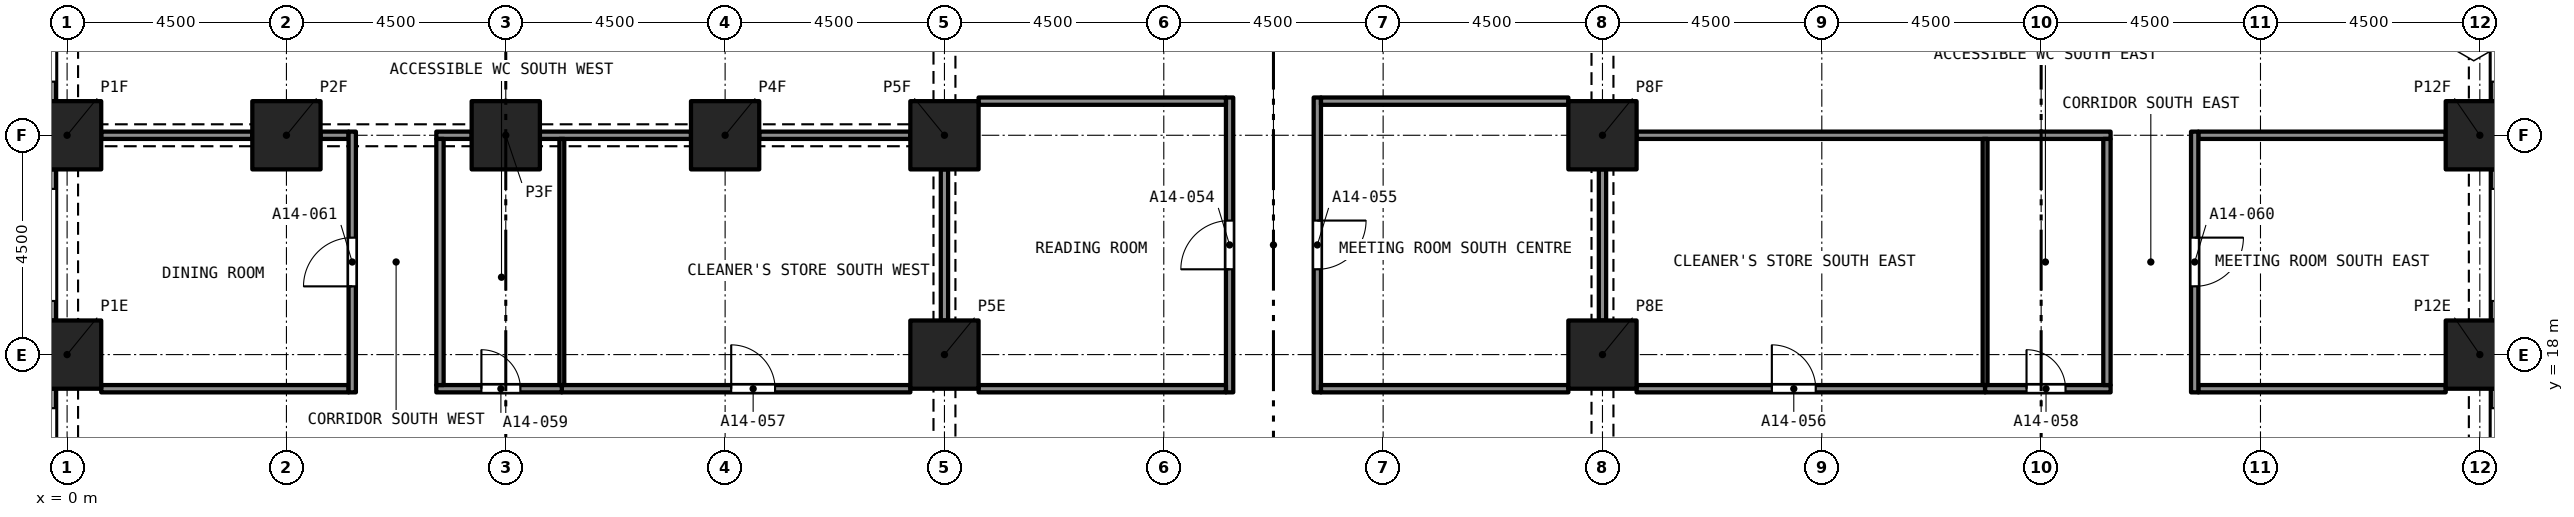
"""IFC4 building model, lengths in metres.
Left out: names, types, materials, properties, quantities, classifications, styles, units other than length and angle.
Written with IfcOpenShell. Run it as: python <this file> out.ifc"""

import sys

from ifc_helpers import new_model, si_unit, direction, frame, frame_2d, origin, origin_2d, place, context, subcontext, project, spatial, rectangle, extrude, element, fill, save


model = new_model("IFC4")
c1 = context("Model", 3, precision=1e-05, world=origin(), true_north=direction((0.0, 1.0)))
c2 = subcontext(c1, "Body", "Model", "MODEL_VIEW")
j1 = project(units=[si_unit("LENGTHUNIT", "METRE"), si_unit("PLANEANGLEUNIT", "RADIAN")], contexts=[c1])
p1 = place(None, origin())
s1 = spatial("IfcSite", under=j1, at=p1, CompositionType="ELEMENT")
p2 = place(p1, origin())
s2 = spatial("IfcBuilding", under=s1, at=p2, CompositionType="ELEMENT")
p3 = place(p2, frame((0.0, 0.0, 56.0)))
s3 = spatial("IfcBuildingStorey", under=s2, at=p3, CompositionType="ELEMENT", Elevation=56.0)
for number, where, z_axis, x_axis in (
    (1, (0.0, 18.0, 0.0), (0.0, 0.0, 1.0), (1.0, 0.0, 0.0)),
    (2, (18.0, 18.0, 0.0), (0.0, 0.0, 1.0), (1.0, 0.0, 0.0)),
    (3, (31.5, 18.0, 0.0), (0.0, 0.0, 1.0), (1.0, 0.0, 0.0)),
    (4, (49.5, 18.0, 0.0), (0.0, 0.0, 1.0), (1.0, 0.0, 0.0)),
    (5, (0.0, 22.5, 0.0), (0.0, 0.0, 1.0), (1.0, 0.0, 0.0)),
    (6, (4.5, 22.5, 0.0), (0.0, 0.0, 1.0), (1.0, 0.0, 0.0)),
    (7, (9.0, 22.5, 0.0), (0.0, 0.0, 1.0), (1.0, 0.0, 0.0)),
    (8, (13.5, 22.5, 0.0), (0.0, 0.0, 1.0), (1.0, 0.0, 0.0)),
    (9, (18.0, 22.5, 0.0), (0.0, 0.0, 1.0), (1.0, 0.0, 0.0)),
    (10, (31.5, 22.5, 0.0), (0.0, 0.0, 1.0), (1.0, 0.0, 0.0)),
    (11, (49.5, 22.5, 0.0), (0.0, 0.0, 1.0), (1.0, 0.0, 0.0)),
):
    element("IfcColumn", number, at=place(p3, frame(where, z_axis=z_axis, x_axis=x_axis)), inside=s3, PredefinedType="COLUMN", context=c2, shape_type="SweptSolid", body=[
        extrude(rectangle(XDim=1.4, YDim=1.4, at=origin_2d()), origin(), (0.0, 0.0, 1.0), 3.2),
    ])
p4 = place(p3, frame((49.875, 17.3, 0.0), z_axis=(0.0, 0.0, 1.0), x_axis=(0.0, -1.0, 0.0)))
e12 = element("IfcWall", 12, at=p4, inside=s3, PredefinedType="SOLIDWALL", context=c2, shape_type="SweptSolid", body=[
    extrude(rectangle(XDim=3.1, YDim=0.3, at=frame_2d((1.55, 0.0))), origin(), (0.0, 0.0, 1.0), 3.2),
])
p5 = place(p4, frame((0.4, 0.0, 0.45)))
e13 = element("IfcOpeningElement", 13, at=p5, cuts=e12, PredefinedType="OPENING", context=c2, shape_type="SweptSolid", body=[
    extrude(rectangle(XDim=2.3, YDim=1.95, at=frame_2d((1.15, 0.975))), frame((0.0, 0.16, 0.0), z_axis=(0.0, -1.0, 0.0), x_axis=(1.0, 0.0, 0.0)), (0.0, 0.0, 1.0), 0.32),
])
p6 = place(p3, frame((49.875, 21.8, 0.0), z_axis=(0.0, 0.0, 1.0), x_axis=(0.0, -1.0, 0.0)))
e14 = element("IfcWall", 14, at=p6, inside=s3, PredefinedType="SOLIDWALL", context=c2, shape_type="SweptSolid", body=[
    extrude(rectangle(XDim=3.1, YDim=0.3, at=frame_2d((1.55, 0.0))), origin(), (0.0, 0.0, 1.0), 3.2),
])
p7 = place(p6, frame((0.4, 0.0, 0.45)))
e15 = element("IfcOpeningElement", 15, at=p7, cuts=e14, PredefinedType="OPENING", context=c2, shape_type="SweptSolid", body=[
    extrude(rectangle(XDim=2.3, YDim=1.95, at=frame_2d((1.15, 0.975))), frame((0.0, 0.16, 0.0), z_axis=(0.0, -1.0, 0.0), x_axis=(1.0, 0.0, 0.0)), (0.0, 0.0, 1.0), 0.32),
])
p8 = place(p3, frame((49.875, 26.3, 0.0), z_axis=(0.0, 0.0, 1.0), x_axis=(0.0, -1.0, 0.0)))
e16 = element("IfcWall", 16, at=p8, inside=s3, PredefinedType="SOLIDWALL", context=c2, shape_type="SweptSolid", body=[
    extrude(rectangle(XDim=3.1, YDim=0.3, at=frame_2d((1.55, 0.0))), origin(), (0.0, 0.0, 1.0), 3.2),
])
p9 = place(p8, frame((0.4, 0.0, 0.45)))
e17 = element("IfcOpeningElement", 17, at=p9, cuts=e16, PredefinedType="OPENING", context=c2, shape_type="SweptSolid", body=[
    extrude(rectangle(XDim=2.3, YDim=1.95, at=frame_2d((1.15, 0.975))), frame((0.0, 0.16, 0.0), z_axis=(0.0, -1.0, 0.0), x_axis=(1.0, 0.0, 0.0)), (0.0, 0.0, 1.0), 0.32),
])
p10 = place(p3, frame((-0.375, 23.2, 0.0), z_axis=(0.0, 0.0, 1.0), x_axis=(0.0, 1.0, 0.0)))
e18 = element("IfcWall", 18, at=p10, inside=s3, PredefinedType="SOLIDWALL", context=c2, shape_type="SweptSolid", body=[
    extrude(rectangle(XDim=3.1, YDim=0.3, at=frame_2d((1.55, 0.0))), origin(), (0.0, 0.0, 1.0), 3.2),
])
p11 = place(p10, frame((0.4, 0.0, 0.45)))
e19 = element("IfcOpeningElement", 19, at=p11, cuts=e18, PredefinedType="OPENING", context=c2, shape_type="SweptSolid", body=[
    extrude(rectangle(XDim=2.3, YDim=1.95, at=frame_2d((1.15, 0.975))), frame((0.0, 0.16, 0.0), z_axis=(0.0, -1.0, 0.0), x_axis=(1.0, 0.0, 0.0)), (0.0, 0.0, 1.0), 0.32),
])
p12 = place(p3, frame((-0.375, 18.7, 0.0), z_axis=(0.0, 0.0, 1.0), x_axis=(0.0, 1.0, 0.0)))
e20 = element("IfcWall", 20, at=p12, inside=s3, PredefinedType="SOLIDWALL", context=c2, shape_type="SweptSolid", body=[
    extrude(rectangle(XDim=3.1, YDim=0.3, at=frame_2d((1.55, 0.0))), origin(), (0.0, 0.0, 1.0), 3.2),
])
p13 = place(p12, frame((0.4, 0.0, 0.45)))
e21 = element("IfcOpeningElement", 21, at=p13, cuts=e20, PredefinedType="OPENING", context=c2, shape_type="SweptSolid", body=[
    extrude(rectangle(XDim=2.3, YDim=1.95, at=frame_2d((1.15, 0.975))), frame((0.0, 0.16, 0.0), z_axis=(0.0, -1.0, 0.0), x_axis=(1.0, 0.0, 0.0)), (0.0, 0.0, 1.0), 0.32),
])
p14 = place(p3, frame((-0.375, 14.2, 0.0), z_axis=(0.0, 0.0, 1.0), x_axis=(0.0, 1.0, 0.0)))
e22 = element("IfcWall", 22, at=p14, inside=s3, PredefinedType="SOLIDWALL", context=c2, shape_type="SweptSolid", body=[
    extrude(rectangle(XDim=3.1, YDim=0.3, at=frame_2d((1.55, 0.0))), origin(), (0.0, 0.0, 1.0), 3.2),
])
p15 = place(p14, frame((0.4, 0.0, 0.45)))
e23 = element("IfcOpeningElement", 23, at=p15, cuts=e22, PredefinedType="OPENING", context=c2, shape_type="SweptSolid", body=[
    extrude(rectangle(XDim=2.3, YDim=1.95, at=frame_2d((1.15, 0.975))), frame((0.0, 0.16, 0.0), z_axis=(0.0, -1.0, 0.0), x_axis=(1.0, 0.0, 0.0)), (0.0, 0.0, 1.0), 0.32),
])
p16 = place(p3, frame((23.85, 17.225, 0.0), z_axis=(0.0, 0.0, 1.0), x_axis=(0.0, 1.0, 0.0)))
e24 = element("IfcWall", 24, at=p16, inside=s3, PredefinedType="PARTITIONING", context=c2, shape_type="SweptSolid", body=[
    extrude(rectangle(XDim=6.05, YDim=0.15, at=frame_2d((3.025, 0.0))), origin(), (0.0, 0.0, 1.0), 2.75),
])
p17 = place(p16, frame((2.525, 0.0, 0.0)))
e25 = element("IfcOpeningElement", 25, at=p17, cuts=e24, PredefinedType="OPENING", context=c2, shape_type="SweptSolid", body=[
    extrude(rectangle(XDim=1.0, YDim=2.1, at=frame_2d((0.5, 1.05))), frame((0.0, 0.085, 0.0), z_axis=(0.0, -1.0, 0.0), x_axis=(1.0, 0.0, 0.0)), (0.0, 0.0, 1.0), 0.17),
])
p18 = place(p3, frame((25.65, 23.275, 0.0), z_axis=(0.0, 0.0, 1.0), x_axis=(0.0, -1.0, 0.0)))
e26 = element("IfcWall", 26, at=p18, inside=s3, PredefinedType="PARTITIONING", context=c2, shape_type="SweptSolid", body=[
    extrude(rectangle(XDim=6.05, YDim=0.15, at=frame_2d((3.025, 0.0))), origin(), (0.0, 0.0, 1.0), 2.75),
])
p19 = place(p18, frame((2.525, 0.0, 0.0)))
e27 = element("IfcOpeningElement", 27, at=p19, cuts=e26, PredefinedType="OPENING", context=c2, shape_type="SweptSolid", body=[
    extrude(rectangle(XDim=1.0, YDim=2.1, at=frame_2d((0.5, 1.05))), frame((0.0, 0.085, 0.0), z_axis=(0.0, -1.0, 0.0), x_axis=(1.0, 0.0, 0.0)), (0.0, 0.0, 1.0), 0.17),
])
for number, where, z_axis, x_axis in (
    (28, (18.7, 17.3, 0.0), (0.0, 0.0, 1.0), (1.0, 0.0, 0.0)),
    (29, (25.725, 17.3, 0.0), (0.0, 0.0, 1.0), (1.0, 0.0, 0.0)),
):
    element("IfcWall", number, at=place(p3, frame(where, z_axis=z_axis, x_axis=x_axis)), inside=s3, PredefinedType="PARTITIONING", context=c2, shape_type="SweptSolid", body=[
        extrude(rectangle(XDim=5.075, YDim=0.15, at=frame_2d((2.538, 0.0))), origin(), (0.0, 0.0, 1.0), 2.75),
    ])
p20 = place(p3, frame((32.2, 17.3, 0.0), z_axis=(0.0, 0.0, 1.0), x_axis=(1.0, 0.0, 0.0)))
e30 = element("IfcWall", 30, at=p20, inside=s3, PredefinedType="PARTITIONING", context=c2, shape_type="SweptSolid", body=[
    extrude(rectangle(XDim=7.15, YDim=0.15, at=frame_2d((3.575, 0.0))), origin(), (0.0, 0.0, 1.0), 2.9),
])
p21 = place(p20, frame((2.775, 0.0, 0.0)))
e31 = element("IfcOpeningElement", 31, at=p21, cuts=e30, PredefinedType="OPENING", context=c2, shape_type="SweptSolid", body=[
    extrude(rectangle(XDim=0.9, YDim=2.1, at=frame_2d((0.45, 1.05))), frame((0.0, 0.085, 0.0), z_axis=(0.0, -1.0, 0.0), x_axis=(1.0, 0.0, 0.0)), (0.0, 0.0, 1.0), 0.17),
])
p22 = place(p3, frame((10.15, 17.3, 0.0), z_axis=(0.0, 0.0, 1.0), x_axis=(1.0, 0.0, 0.0)))
e32 = element("IfcWall", 32, at=p22, inside=s3, PredefinedType="PARTITIONING", context=c2, shape_type="SweptSolid", body=[
    extrude(rectangle(XDim=7.15, YDim=0.15, at=frame_2d((3.575, 0.0))), origin(), (0.0, 0.0, 1.0), 2.9),
])
p23 = place(p22, frame((3.475, 0.0, 0.0)))
e33 = element("IfcOpeningElement", 33, at=p23, cuts=e32, PredefinedType="OPENING", context=c2, shape_type="SweptSolid", body=[
    extrude(rectangle(XDim=0.9, YDim=2.1, at=frame_2d((0.45, 1.05))), frame((0.0, 0.085, 0.0), z_axis=(0.0, -1.0, 0.0), x_axis=(1.0, 0.0, 0.0)), (0.0, 0.0, 1.0), 0.17),
])
p24 = place(p3, frame((39.35, 17.3, 0.0), z_axis=(0.0, 0.0, 1.0), x_axis=(1.0, 0.0, 0.0)))
e34 = element("IfcWall", 34, at=p24, inside=s3, PredefinedType="PARTITIONING", context=c2, shape_type="SweptSolid", body=[
    extrude(rectangle(XDim=2.575, YDim=0.15, at=frame_2d((1.288, 0.0))), origin(), (0.0, 0.0, 1.0), 2.9),
])
p25 = place(p24, frame((0.85, 0.0, 0.0)))
e35 = element("IfcOpeningElement", 35, at=p25, cuts=e34, PredefinedType="OPENING", context=c2, shape_type="SweptSolid", body=[
    extrude(rectangle(XDim=0.8, YDim=2.1, at=frame_2d((0.4, 1.05))), frame((0.0, 0.085, 0.0), z_axis=(0.0, -1.0, 0.0), x_axis=(1.0, 0.0, 0.0)), (0.0, 0.0, 1.0), 0.17),
])
p26 = place(p3, frame((7.575, 17.3, 0.0), z_axis=(0.0, 0.0, 1.0), x_axis=(1.0, 0.0, 0.0)))
e36 = element("IfcWall", 36, at=p26, inside=s3, PredefinedType="PARTITIONING", context=c2, shape_type="SweptSolid", body=[
    extrude(rectangle(XDim=2.575, YDim=0.15, at=frame_2d((1.288, 0.0))), origin(), (0.0, 0.0, 1.0), 2.9),
])
p27 = place(p26, frame((0.925, 0.0, 0.0)))
e37 = element("IfcOpeningElement", 37, at=p27, cuts=e36, PredefinedType="OPENING", context=c2, shape_type="SweptSolid", body=[
    extrude(rectangle(XDim=0.8, YDim=2.1, at=frame_2d((0.4, 1.05))), frame((0.0, 0.085, 0.0), z_axis=(0.0, -1.0, 0.0), x_axis=(1.0, 0.0, 0.0)), (0.0, 0.0, 1.0), 0.17),
])
for number, where, z_axis, x_axis in (
    (38, (43.725, 17.3, 0.0), (0.0, 0.0, 1.0), (1.0, 0.0, 0.0)),
    (39, (0.7, 17.3, 0.0), (0.0, 0.0, 1.0), (1.0, 0.0, 0.0)),
):
    element("IfcWall", number, at=place(p3, frame(where, z_axis=z_axis, x_axis=x_axis)), inside=s3, PredefinedType="PARTITIONING", context=c2, shape_type="SweptSolid", body=[
        extrude(rectangle(XDim=5.075, YDim=0.15, at=frame_2d((2.538, 0.0))), origin(), (0.0, 0.0, 1.0), 2.9),
    ])
p28 = place(p3, frame((18.7, 23.2, 0.0), z_axis=(0.0, 0.0, 1.0), x_axis=(1.0, 0.0, 0.0)))
e40 = element("IfcWall", 40, at=p28, inside=s3, PredefinedType="PARTITIONING", context=c2, shape_type="SweptSolid", body=[
    extrude(rectangle(XDim=5.075, YDim=0.15, at=frame_2d((2.538, 0.0))), origin(), (0.0, 0.0, 1.0), 2.75),
])
p29 = place(p3, frame((18.0, 18.7, 0.0), z_axis=(0.0, 0.0, 1.0), x_axis=(0.0, 1.0, 0.0)))
e41 = element("IfcWall", 41, at=p29, inside=s3, PredefinedType="PARTITIONING", context=c2, shape_type="SweptSolid", body=[
    extrude(rectangle(XDim=3.1, YDim=0.15, at=frame_2d((1.55, 0.0))), origin(), (0.0, 0.0, 1.0), 2.38),
])
p30 = place(p3, frame((25.725, 23.2, 0.0), z_axis=(0.0, 0.0, 1.0), x_axis=(1.0, 0.0, 0.0)))
e42 = element("IfcWall", 42, at=p30, inside=s3, PredefinedType="PARTITIONING", context=c2, shape_type="SweptSolid", body=[
    extrude(rectangle(XDim=5.075, YDim=0.15, at=frame_2d((2.538, 0.0))), origin(), (0.0, 0.0, 1.0), 2.75),
])
p31 = place(p3, frame((31.5, 18.7, 0.0), z_axis=(0.0, 0.0, 1.0), x_axis=(0.0, 1.0, 0.0)))
e43 = element("IfcWall", 43, at=p31, inside=s3, PredefinedType="PARTITIONING", context=c2, shape_type="SweptSolid", body=[
    extrude(rectangle(XDim=3.1, YDim=0.15, at=frame_2d((1.55, 0.0))), origin(), (0.0, 0.0, 1.0), 2.38),
])
p32 = place(p3, frame((32.2, 22.5, 0.0), z_axis=(0.0, 0.0, 1.0), x_axis=(1.0, 0.0, 0.0)))
e44 = element("IfcWall", 44, at=p32, inside=s3, PredefinedType="PARTITIONING", context=c2, shape_type="SweptSolid", body=[
    extrude(rectangle(XDim=9.725, YDim=0.15, at=frame_2d((4.863, 0.0))), origin(), (0.0, 0.0, 1.0), 2.9),
])
p33 = place(p3, frame((43.725, 22.5, 0.0), z_axis=(0.0, 0.0, 1.0), x_axis=(1.0, 0.0, 0.0)))
e45 = element("IfcWall", 45, at=p33, inside=s3, PredefinedType="PARTITIONING", context=c2, shape_type="SweptSolid", body=[
    extrude(rectangle(XDim=5.075, YDim=0.15, at=frame_2d((2.538, 0.0))), origin(), (0.0, 0.0, 1.0), 2.9),
])
for number, where, z_axis, x_axis in (
    (46, (14.2, 22.5, 0.0), (0.0, 0.0, 1.0), (1.0, 0.0, 0.0)),
    (47, (9.7, 22.5, 0.0), (0.0, 0.0, 1.0), (1.0, 0.0, 0.0)),
):
    element("IfcWall", number, at=place(p3, frame(where, z_axis=z_axis, x_axis=x_axis)), inside=s3, PredefinedType="PARTITIONING", context=c2, shape_type="SweptSolid", body=[
        extrude(rectangle(XDim=3.1, YDim=0.15, at=frame_2d((1.55, 0.0))), origin(), (0.0, 0.0, 1.0), 2.38),
    ])
p34 = place(p3, frame((7.575, 22.5, 0.0), z_axis=(0.0, 0.0, 1.0), x_axis=(1.0, 0.0, 0.0)))
e48 = element("IfcWall", 48, at=p34, inside=s3, PredefinedType="PARTITIONING", context=c2, shape_type="SweptSolid", body=[
    extrude(rectangle(XDim=0.725, YDim=0.15, at=frame_2d((0.363, 0.0))), origin(), (0.0, 0.0, 1.0), 2.38),
])
p35 = place(p3, frame((5.2, 22.5, 0.0), z_axis=(0.0, 0.0, 1.0), x_axis=(1.0, 0.0, 0.0)))
e49 = element("IfcWall", 49, at=p35, inside=s3, PredefinedType="PARTITIONING", context=c2, shape_type="SweptSolid", body=[
    extrude(rectangle(XDim=0.575, YDim=0.15, at=frame_2d((0.288, 0.0))), origin(), (0.0, 0.0, 1.0), 2.38),
])
p36 = place(p3, frame((0.7, 22.5, 0.0), z_axis=(0.0, 0.0, 1.0), x_axis=(1.0, 0.0, 0.0)))
e50 = element("IfcWall", 50, at=p36, inside=s3, PredefinedType="PARTITIONING", context=c2, shape_type="SweptSolid", body=[
    extrude(rectangle(XDim=3.1, YDim=0.15, at=frame_2d((1.55, 0.0))), origin(), (0.0, 0.0, 1.0), 2.38),
])
p37 = place(p3, frame((41.85, 17.375, 0.0), z_axis=(0.0, 0.0, 1.0), x_axis=(0.0, 1.0, 0.0)))
e51 = element("IfcWall", 51, at=p37, inside=s3, PredefinedType="PARTITIONING", context=c2, shape_type="SweptSolid", body=[
    extrude(rectangle(XDim=5.05, YDim=0.15, at=frame_2d((2.525, 0.0))), origin(), (0.0, 0.0, 1.0), 2.9),
])
p38 = place(p3, frame((43.65, 22.575, 0.0), z_axis=(0.0, 0.0, 1.0), x_axis=(0.0, -1.0, 0.0)))
e52 = element("IfcWall", 52, at=p38, inside=s3, PredefinedType="PARTITIONING", context=c2, shape_type="SweptSolid", body=[
    extrude(rectangle(XDim=5.35, YDim=0.15, at=frame_2d((2.675, 0.0))), origin(), (0.0, 0.0, 1.0), 2.9),
])
p39 = place(p38, frame((2.175, 0.0, 0.0)))
e53 = element("IfcOpeningElement", 53, at=p39, cuts=e52, PredefinedType="OPENING", context=c2, shape_type="SweptSolid", body=[
    extrude(rectangle(XDim=1.0, YDim=2.1, at=frame_2d((0.5, 1.05))), frame((0.0, 0.085, 0.0), z_axis=(0.0, -1.0, 0.0), x_axis=(1.0, 0.0, 0.0)), (0.0, 0.0, 1.0), 0.17),
])
p40 = place(p3, frame((7.65, 17.375, 0.0), z_axis=(0.0, 0.0, 1.0), x_axis=(0.0, 1.0, 0.0)))
e54 = element("IfcWall", 54, at=p40, inside=s3, PredefinedType="PARTITIONING", context=c2, shape_type="SweptSolid", body=[
    extrude(rectangle(XDim=5.05, YDim=0.15, at=frame_2d((2.525, 0.0))), origin(), (0.0, 0.0, 1.0), 2.9),
])
p41 = place(p3, frame((5.85, 17.225, 0.0), z_axis=(0.0, 0.0, 1.0), x_axis=(0.0, 1.0, 0.0)))
e55 = element("IfcWall", 55, at=p41, inside=s3, PredefinedType="PARTITIONING", context=c2, shape_type="SweptSolid", body=[
    extrude(rectangle(XDim=5.35, YDim=0.15, at=frame_2d((2.675, 0.0))), origin(), (0.0, 0.0, 1.0), 2.9),
])
p42 = place(p41, frame((2.175, 0.0, 0.0)))
e56 = element("IfcOpeningElement", 56, at=p42, cuts=e55, PredefinedType="OPENING", context=c2, shape_type="SweptSolid", body=[
    extrude(rectangle(XDim=1.0, YDim=2.1, at=frame_2d((0.5, 1.05))), frame((0.0, 0.085, 0.0), z_axis=(0.0, -1.0, 0.0), x_axis=(1.0, 0.0, 0.0)), (0.0, 0.0, 1.0), 0.17),
])
for number, where, z_axis, x_axis in (
    (57, (39.35, 17.375, 0.0), (0.0, 0.0, 1.0), (0.0, 1.0, 0.0)),
    (58, (10.15, 17.375, 0.0), (0.0, 0.0, 1.0), (0.0, 1.0, 0.0)),
):
    element("IfcWall", number, at=place(p3, frame(where, z_axis=z_axis, x_axis=x_axis)), inside=s3, PredefinedType="PARTITIONING", context=c2, shape_type="SweptSolid", body=[
        extrude(rectangle(XDim=5.05, YDim=0.1, at=frame_2d((2.525, 0.0))), origin(), (0.0, 0.0, 1.0), 2.9),
    ])
p43 = place(p17, origin())
e59 = element("IfcDoor", 59, at=p43, inside=s3, OperationType="SINGLE_SWING_RIGHT", PredefinedType="DOOR", context=c2, shape_type="SweptSolid", body=[
    extrude(rectangle(XDim=1.0, YDim=2.1, at=frame_2d((0.5, 1.05))), frame((0.0, 0.025, 0.0), z_axis=(0.0, -1.0, 0.0), x_axis=(1.0, 0.0, 0.0)), (0.0, 0.0, 1.0), 0.05),
])
fill(e25, e59)
p44 = place(p19, origin())
e60 = element("IfcDoor", 60, at=p44, inside=s3, OperationType="SINGLE_SWING_RIGHT", PredefinedType="DOOR", context=c2, shape_type="SweptSolid", body=[
    extrude(rectangle(XDim=1.0, YDim=2.1, at=frame_2d((0.5, 1.05))), frame((0.0, 0.025, 0.0), z_axis=(0.0, -1.0, 0.0), x_axis=(1.0, 0.0, 0.0)), (0.0, 0.0, 1.0), 0.05),
])
fill(e27, e60)
p45 = place(p21, origin())
e61 = element("IfcDoor", 61, at=p45, inside=s3, OperationType="SINGLE_SWING_LEFT", PredefinedType="DOOR", context=c2, shape_type="SweptSolid", body=[
    extrude(rectangle(XDim=0.9, YDim=2.1, at=frame_2d((0.45, 1.05))), frame((0.0, 0.025, 0.0), z_axis=(0.0, -1.0, 0.0), x_axis=(1.0, 0.0, 0.0)), (0.0, 0.0, 1.0), 0.05),
])
fill(e31, e61)
p46 = place(p23, origin())
e62 = element("IfcDoor", 62, at=p46, inside=s3, OperationType="SINGLE_SWING_RIGHT", PredefinedType="DOOR", context=c2, shape_type="SweptSolid", body=[
    extrude(rectangle(XDim=0.9, YDim=2.1, at=frame_2d((0.45, 1.05))), frame((0.0, 0.025, 0.0), z_axis=(0.0, -1.0, 0.0), x_axis=(1.0, 0.0, 0.0)), (0.0, 0.0, 1.0), 0.05),
])
fill(e33, e62)
p47 = place(p25, origin())
e63 = element("IfcDoor", 63, at=p47, inside=s3, OperationType="SINGLE_SWING_LEFT", PredefinedType="DOOR", context=c2, shape_type="SweptSolid", body=[
    extrude(rectangle(XDim=0.8, YDim=2.1, at=frame_2d((0.4, 1.05))), frame((0.0, 0.025, 0.0), z_axis=(0.0, -1.0, 0.0), x_axis=(1.0, 0.0, 0.0)), (0.0, 0.0, 1.0), 0.05),
])
fill(e35, e63)
p48 = place(p27, origin())
e64 = element("IfcDoor", 64, at=p48, inside=s3, OperationType="SINGLE_SWING_RIGHT", PredefinedType="DOOR", context=c2, shape_type="SweptSolid", body=[
    extrude(rectangle(XDim=0.8, YDim=2.1, at=frame_2d((0.4, 1.05))), frame((0.0, 0.025, 0.0), z_axis=(0.0, -1.0, 0.0), x_axis=(1.0, 0.0, 0.0)), (0.0, 0.0, 1.0), 0.05),
])
fill(e37, e64)
p49 = place(p39, origin())
e65 = element("IfcDoor", 65, at=p49, inside=s3, OperationType="SINGLE_SWING_RIGHT", PredefinedType="DOOR", context=c2, shape_type="SweptSolid", body=[
    extrude(rectangle(XDim=1.0, YDim=2.1, at=frame_2d((0.5, 1.05))), frame((0.0, 0.025, 0.0), z_axis=(0.0, -1.0, 0.0), x_axis=(1.0, 0.0, 0.0)), (0.0, 0.0, 1.0), 0.05),
])
fill(e53, e65)
p50 = place(p42, origin())
e66 = element("IfcDoor", 66, at=p50, inside=s3, OperationType="SINGLE_SWING_LEFT", PredefinedType="DOOR", context=c2, shape_type="SweptSolid", body=[
    extrude(rectangle(XDim=1.0, YDim=2.1, at=frame_2d((0.5, 1.05))), frame((0.0, 0.025, 0.0), z_axis=(0.0, -1.0, 0.0), x_axis=(1.0, 0.0, 0.0)), (0.0, 0.0, 1.0), 0.05),
])
fill(e56, e66)
save(model, sys.argv[1])
